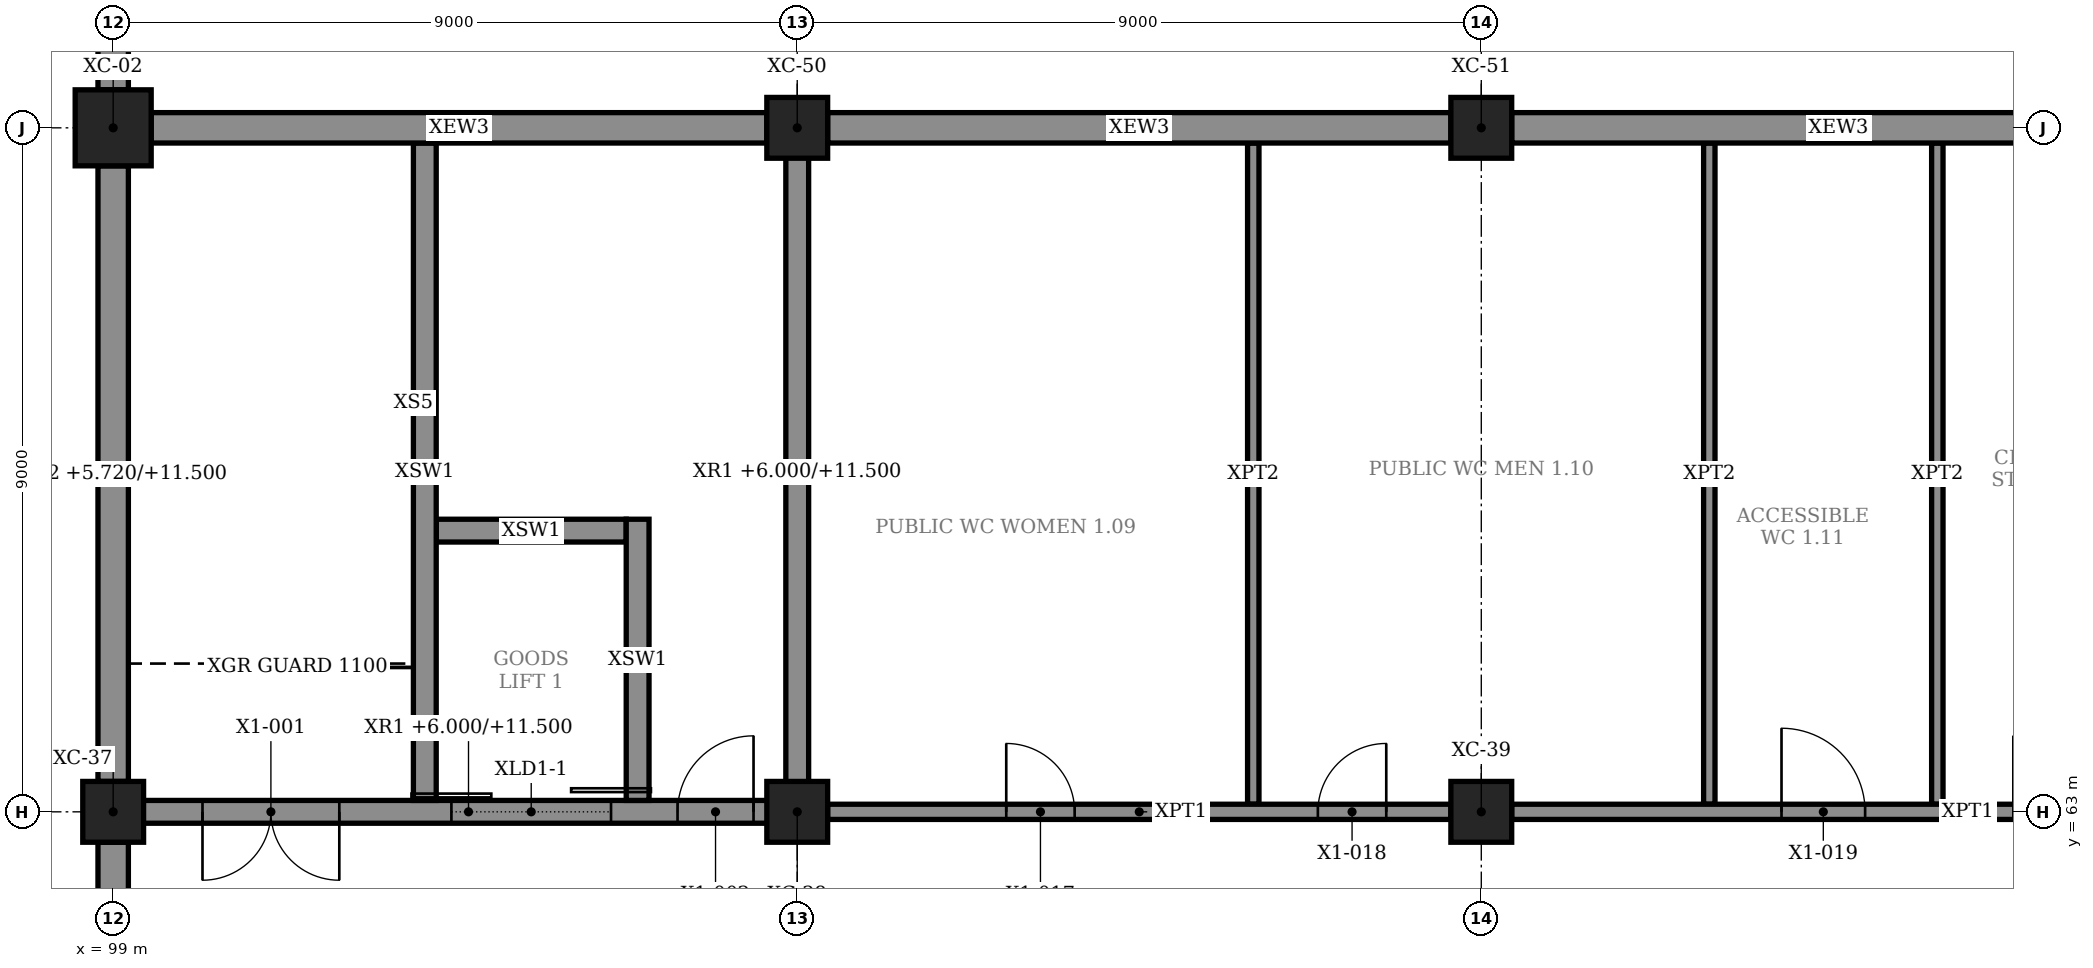
"""IFC4 building model, lengths in metres.
Left out: names, types, materials, properties, quantities, classifications, styles, units other than length and angle.
Written with IfcOpenShell. Run it as: python <this file> out.ifc"""

import sys

from ifc_helpers import new_model, si_unit, direction, frame, frame_2d, origin, origin_2d, place, context, subcontext, project, spatial, rectangle, hollow_rectangle, extrude, element, fill, save


model = new_model("IFC4")
c1 = context("Model", 3, precision=1e-05, world=origin(), true_north=direction((0.0, 1.0)))
c2 = subcontext(c1, "Body", "Model", "MODEL_VIEW")
j1 = project(units=[si_unit("LENGTHUNIT", "METRE"), si_unit("PLANEANGLEUNIT", "RADIAN")], contexts=[c1])
p1 = place(None, origin())
s1 = spatial("IfcSite", under=j1, at=p1, CompositionType="ELEMENT")
p2 = place(p1, origin())
s2 = spatial("IfcBuilding", under=s1, at=p2, CompositionType="ELEMENT")
p3 = place(p2, frame((0.0, 0.0, 6.0)))
s3 = spatial("IfcBuildingStorey", under=s2, at=p3, CompositionType="ELEMENT", Elevation=6.0)
p4 = place(p3, frame((99.0, 72.0, 0.0), z_axis=(0.0, 0.0, 1.0), x_axis=(1.0, 0.0, 0.0)))
e1 = element("IfcColumn", 1, at=p4, inside=s3, PredefinedType="COLUMN", context=c2, shape_type="SweptSolid", body=[
    extrude(hollow_rectangle(XDim=1.0, YDim=1.0, WallThickness=0.032, at=origin_2d()), origin(), (0.0, 0.0, 1.0), 5.5),
])
for number, where, z_axis, x_axis in (
    (2, (99.0, 63.0, 0.0), (0.0, 0.0, 1.0), (1.0, 0.0, 0.0)),
    (3, (108.0, 63.0, 0.0), (0.0, 0.0, 1.0), (1.0, 0.0, 0.0)),
    (4, (117.0, 63.0, 0.0), (0.0, 0.0, 1.0), (1.0, 0.0, 0.0)),
    (5, (108.0, 72.0, 0.0), (0.0, 0.0, 1.0), (1.0, 0.0, 0.0)),
    (6, (117.0, 72.0, 0.0), (0.0, 0.0, 1.0), (1.0, 0.0, 0.0)),
):
    element("IfcColumn", number, at=place(p3, frame(where, z_axis=z_axis, x_axis=x_axis)), inside=s3, PredefinedType="COLUMN", context=c2, shape_type="SweptSolid", body=[
        extrude(rectangle(XDim=0.8, YDim=0.8, at=origin_2d()), origin(), (0.0, 0.0, 1.0), 5.5),
    ])
p5 = place(p3, frame((99.2, 63.0, 0.0), z_axis=(0.0, 0.0, 1.0), x_axis=(1.0, 0.0, 0.0)))
e7 = element("IfcWall", 7, at=p5, inside=s3, PredefinedType="SHEAR", context=c2, shape_type="SweptSolid", body=[
    extrude(rectangle(XDim=8.95, YDim=0.3, at=frame_2d((4.475, 0.0))), origin(), (0.0, 0.0, 1.0), 5.5),
])
p6 = place(p5, frame((0.975, 0.0, 0.0)))
e8 = element("IfcOpeningElement", 8, at=p6, cuts=e7, PredefinedType="OPENING", context=c2, shape_type="SweptSolid", body=[
    extrude(rectangle(XDim=1.8, YDim=2.4, at=frame_2d((0.9, 1.2))), frame((0.0, 0.16, 0.0), z_axis=(0.0, -1.0, 0.0), x_axis=(1.0, 0.0, 0.0)), (0.0, 0.0, 1.0), 0.32),
])
p7 = place(p5, frame((4.25, 0.0, 0.0)))
e9 = element("IfcOpeningElement", 9, at=p7, cuts=e7, PredefinedType="OPENING", context=c2, shape_type="SweptSolid", body=[
    extrude(rectangle(XDim=2.1, YDim=2.4, at=frame_2d((1.05, 1.2))), frame((0.0, 0.16, 0.0), z_axis=(0.0, -1.0, 0.0), x_axis=(1.0, 0.0, 0.0)), (0.0, 0.0, 1.0), 0.32),
])
p8 = place(p5, frame((7.225, 0.0, 0.0)))
e10 = element("IfcOpeningElement", 10, at=p8, cuts=e7, PredefinedType="OPENING", context=c2, shape_type="SweptSolid", body=[
    extrude(rectangle(XDim=1.0, YDim=2.4, at=frame_2d((0.5, 1.2))), frame((0.0, 0.16, 0.0), z_axis=(0.0, -1.0, 0.0), x_axis=(1.0, 0.0, 0.0)), (0.0, 0.0, 1.0), 0.32),
])
p9 = place(p3, frame((108.0, 63.15, 0.0), z_axis=(0.0, 0.0, 1.0), x_axis=(0.0, 1.0, 0.0)))
e11 = element("IfcWall", 11, at=p9, inside=s3, PredefinedType="SHEAR", context=c2, shape_type="SweptSolid", body=[
    extrude(rectangle(XDim=8.65, YDim=0.3, at=frame_2d((4.325, 0.0))), origin(), (0.0, 0.0, 1.0), 5.5),
])
for number, where, z_axis, x_axis in (
    (12, (99.0, 54.5, -0.28), (0.0, 0.0, 1.0), (0.0, 1.0, 0.0)),
    (13, (99.0, 63.4, -0.28), (0.0, 0.0, 1.0), (0.0, 1.0, 0.0)),
):
    element("IfcWall", number, at=place(p3, frame(where, z_axis=z_axis, x_axis=x_axis)), inside=s3, PredefinedType="SOLIDWALL", context=c2, shape_type="SweptSolid", body=[
        extrude(rectangle(XDim=8.1, YDim=0.4, at=frame_2d((4.05, 0.0))), origin(), (0.0, 0.0, 1.0), 5.78),
    ])
p10 = place(p3, frame((99.0, 72.5, 0.0), z_axis=(0.0, 0.0, 1.0), x_axis=(0.0, 1.0, 0.0)))
e14 = element("IfcWall", 14, at=p10, inside=s3, PredefinedType="SOLIDWALL", context=c2, shape_type="SweptSolid", body=[
    extrude(rectangle(XDim=17.0, YDim=0.4, at=frame_2d((8.5, 0.0))), origin(), (0.0, 0.0, 1.0), 5.5),
])
p11 = place(p3, frame((99.5, 72.0, -0.28), z_axis=(0.0, 0.0, 1.0), x_axis=(1.0, 0.0, 0.0)))
e15 = element("IfcWall", 15, at=p11, inside=s3, PredefinedType="SOLIDWALL", context=c2, shape_type="SweptSolid", body=[
    extrude(rectangle(XDim=8.1, YDim=0.4, at=frame_2d((4.05, 0.0))), origin(), (0.0, 0.0, 1.0), 5.78),
])
p12 = place(p3, frame((108.4, 72.0, -0.28), z_axis=(0.0, 0.0, 1.0), x_axis=(1.0, 0.0, 0.0)))
e16 = element("IfcWall", 16, at=p12, inside=s3, PredefinedType="SOLIDWALL", context=c2, shape_type="SweptSolid", body=[
    extrude(rectangle(XDim=8.2, YDim=0.4, at=frame_2d((4.1, 0.0))), origin(), (0.0, 0.0, 1.0), 5.78),
])
p13 = place(p3, frame((117.4, 72.0, -0.28), z_axis=(0.0, 0.0, 1.0), x_axis=(1.0, 0.0, 0.0)))
e17 = element("IfcWall", 17, at=p13, inside=s3, PredefinedType="SOLIDWALL", context=c2, shape_type="SweptSolid", body=[
    extrude(rectangle(XDim=8.6, YDim=0.4, at=frame_2d((4.3, 0.0))), origin(), (0.0, 0.0, 1.0), 5.78),
])
p14 = place(p3, frame((103.1, 63.15, 0.0), z_axis=(0.0, 0.0, 1.0), x_axis=(0.0, 1.0, 0.0)))
e18 = element("IfcWall", 18, at=p14, inside=s3, PredefinedType="SHEAR", context=c2, shape_type="SweptSolid", body=[
    extrude(rectangle(XDim=8.65, YDim=0.3, at=frame_2d((4.325, 0.0))), origin(), (0.0, 0.0, 1.0), 5.25),
])
p15 = place(p3, frame((105.9, 63.15, 0.0), z_axis=(0.0, 0.0, 1.0), x_axis=(0.0, 1.0, 0.0)))
e19 = element("IfcWall", 19, at=p15, inside=s3, PredefinedType="SHEAR", context=c2, shape_type="SweptSolid", body=[
    extrude(rectangle(XDim=3.7, YDim=0.3, at=frame_2d((1.85, 0.0))), origin(), (0.0, 0.0, 1.0), 5.25),
])
p16 = place(p3, frame((103.25, 66.7, 0.0), z_axis=(0.0, 0.0, 1.0), x_axis=(1.0, 0.0, 0.0)))
e20 = element("IfcWall", 20, at=p16, inside=s3, PredefinedType="SHEAR", context=c2, shape_type="SweptSolid", body=[
    extrude(rectangle(XDim=2.5, YDim=0.3, at=frame_2d((1.25, 0.0))), origin(), (0.0, 0.0, 1.0), 5.25),
])
p17 = place(p3, frame((108.4, 63.0, 0.0), z_axis=(0.0, 0.0, 1.0), x_axis=(1.0, 0.0, 0.0)))
e21 = element("IfcWall", 21, at=p17, inside=s3, PredefinedType="PARTITIONING", context=c2, shape_type="SweptSolid", body=[
    extrude(rectangle(XDim=8.2, YDim=0.2, at=frame_2d((4.1, 0.0))), origin(), (0.0, 0.0, 1.0), 5.25),
])
p18 = place(p17, frame((2.35, 0.0, 0.015)))
e22 = element("IfcOpeningElement", 22, at=p18, cuts=e21, PredefinedType="OPENING", context=c2, shape_type="SweptSolid", body=[
    extrude(rectangle(XDim=0.9, YDim=2.1, at=frame_2d((0.45, 1.05))), frame((0.0, 0.11, 0.0), z_axis=(0.0, -1.0, 0.0), x_axis=(1.0, 0.0, 0.0)), (0.0, 0.0, 1.0), 0.22),
])
p19 = place(p17, frame((6.45, 0.0, 0.015)))
e23 = element("IfcOpeningElement", 23, at=p19, cuts=e21, PredefinedType="OPENING", context=c2, shape_type="SweptSolid", body=[
    extrude(rectangle(XDim=0.9, YDim=2.1, at=frame_2d((0.45, 1.05))), frame((0.0, 0.11, 0.0), z_axis=(0.0, -1.0, 0.0), x_axis=(1.0, 0.0, 0.0)), (0.0, 0.0, 1.0), 0.22),
])
p20 = place(p3, frame((117.4, 63.0, 0.0), z_axis=(0.0, 0.0, 1.0), x_axis=(1.0, 0.0, 0.0)))
e24 = element("IfcWall", 24, at=p20, inside=s3, PredefinedType="PARTITIONING", context=c2, shape_type="SweptSolid", body=[
    extrude(rectangle(XDim=23.3, YDim=0.2, at=frame_2d((11.65, 0.0))), origin(), (0.0, 0.0, 1.0), 5.25),
])
p21 = place(p20, frame((3.55, 0.0, 0.015)))
e25 = element("IfcOpeningElement", 25, at=p21, cuts=e24, PredefinedType="OPENING", context=c2, shape_type="SweptSolid", body=[
    extrude(rectangle(XDim=1.1, YDim=2.4, at=frame_2d((0.55, 1.2))), frame((0.0, 0.11, 0.0), z_axis=(0.0, -1.0, 0.0), x_axis=(1.0, 0.0, 0.0)), (0.0, 0.0, 1.0), 0.22),
])
p22 = place(p20, frame((6.6, 0.0, 0.015)))
e26 = element("IfcOpeningElement", 26, at=p22, cuts=e24, PredefinedType="OPENING", context=c2, shape_type="SweptSolid", body=[
    extrude(rectangle(XDim=1.0, YDim=2.4, at=frame_2d((0.5, 1.2))), frame((0.0, 0.11, 0.0), z_axis=(0.0, -1.0, 0.0), x_axis=(1.0, 0.0, 0.0)), (0.0, 0.0, 1.0), 0.22),
])
p23 = place(p20, frame((12.6, 0.0, 0.015)))
e27 = element("IfcOpeningElement", 27, at=p23, cuts=e24, PredefinedType="OPENING", context=c2, shape_type="SweptSolid", body=[
    extrude(rectangle(XDim=1.0, YDim=2.4, at=frame_2d((0.5, 1.2))), frame((0.0, 0.11, 0.0), z_axis=(0.0, -1.0, 0.0), x_axis=(1.0, 0.0, 0.0)), (0.0, 0.0, 1.0), 0.22),
])
for number, where, z_axis, x_axis in (
    (28, (114.0, 63.1, 0.0), (0.0, 0.0, 1.0), (0.0, 1.0, 0.0)),
    (29, (120.0, 63.1, 0.0), (0.0, 0.0, 1.0), (0.0, 1.0, 0.0)),
    (30, (123.0, 63.1, 0.0), (0.0, 0.0, 1.0), (0.0, 1.0, 0.0)),
):
    element("IfcWall", number, at=place(p3, frame(where, z_axis=z_axis, x_axis=x_axis)), inside=s3, PredefinedType="PARTITIONING", context=c2, shape_type="SweptSolid", body=[
        extrude(rectangle(XDim=8.7, YDim=0.15, at=frame_2d((4.35, 0.0))), origin(), (0.0, 0.0, 1.0), 5.25),
    ])
p24 = place(p6, frame((1.8, 0.0, 0.0), z_axis=(0.0, 0.0, 1.0), x_axis=(-1.0, 0.0, 0.0)))
e31 = element("IfcDoor", 31, at=p24, inside=s3, OperationType="DOUBLE_DOOR_SINGLE_SWING", PredefinedType="DOOR", context=c2, shape_type="SweptSolid", body=[
    extrude(rectangle(XDim=1.8, YDim=2.4, at=frame_2d((0.9, 1.2))), frame((0.0, 0.025, 0.0), z_axis=(0.0, -1.0, 0.0), x_axis=(1.0, 0.0, 0.0)), (0.0, 0.0, 1.0), 0.05),
])
fill(e8, e31)
p25 = place(p7, origin())
e32 = element("IfcDoor", 32, at=p25, inside=s3, OperationType="DOUBLE_DOOR_SLIDING", PredefinedType="DOOR", context=c2, shape_type="SweptSolid", body=[
    extrude(rectangle(XDim=2.1, YDim=2.4, at=frame_2d((1.05, 1.2))), frame((0.0, 0.025, 0.0), z_axis=(0.0, -1.0, 0.0), x_axis=(1.0, 0.0, 0.0)), (0.0, 0.0, 1.0), 0.05),
])
fill(e9, e32)
p26 = place(p8, origin())
e33 = element("IfcDoor", 33, at=p26, inside=s3, OperationType="SINGLE_SWING_RIGHT", PredefinedType="DOOR", context=c2, shape_type="SweptSolid", body=[
    extrude(rectangle(XDim=1.0, YDim=2.4, at=frame_2d((0.5, 1.2))), frame((0.0, 0.025, 0.0), z_axis=(0.0, -1.0, 0.0), x_axis=(1.0, 0.0, 0.0)), (0.0, 0.0, 1.0), 0.05),
])
fill(e10, e33)
p27 = place(p18, origin())
e34 = element("IfcDoor", 34, at=p27, inside=s3, OperationType="SINGLE_SWING_LEFT", PredefinedType="DOOR", context=c2, shape_type="SweptSolid", body=[
    extrude(rectangle(XDim=0.9, YDim=2.1, at=frame_2d((0.45, 1.05))), frame((0.0, 0.025, 0.0), z_axis=(0.0, -1.0, 0.0), x_axis=(1.0, 0.0, 0.0)), (0.0, 0.0, 1.0), 0.05),
])
fill(e22, e34)
p28 = place(p19, origin())
e35 = element("IfcDoor", 35, at=p28, inside=s3, OperationType="SINGLE_SWING_RIGHT", PredefinedType="DOOR", context=c2, shape_type="SweptSolid", body=[
    extrude(rectangle(XDim=0.9, YDim=2.1, at=frame_2d((0.45, 1.05))), frame((0.0, 0.025, 0.0), z_axis=(0.0, -1.0, 0.0), x_axis=(1.0, 0.0, 0.0)), (0.0, 0.0, 1.0), 0.05),
])
fill(e23, e35)
p29 = place(p21, origin())
e36 = element("IfcDoor", 36, at=p29, inside=s3, OperationType="SINGLE_SWING_LEFT", PredefinedType="DOOR", context=c2, shape_type="SweptSolid", body=[
    extrude(rectangle(XDim=1.1, YDim=2.4, at=frame_2d((0.55, 1.2))), frame((0.0, 0.025, 0.0), z_axis=(0.0, -1.0, 0.0), x_axis=(1.0, 0.0, 0.0)), (0.0, 0.0, 1.0), 0.05),
])
fill(e25, e36)
save(model, sys.argv[1])
